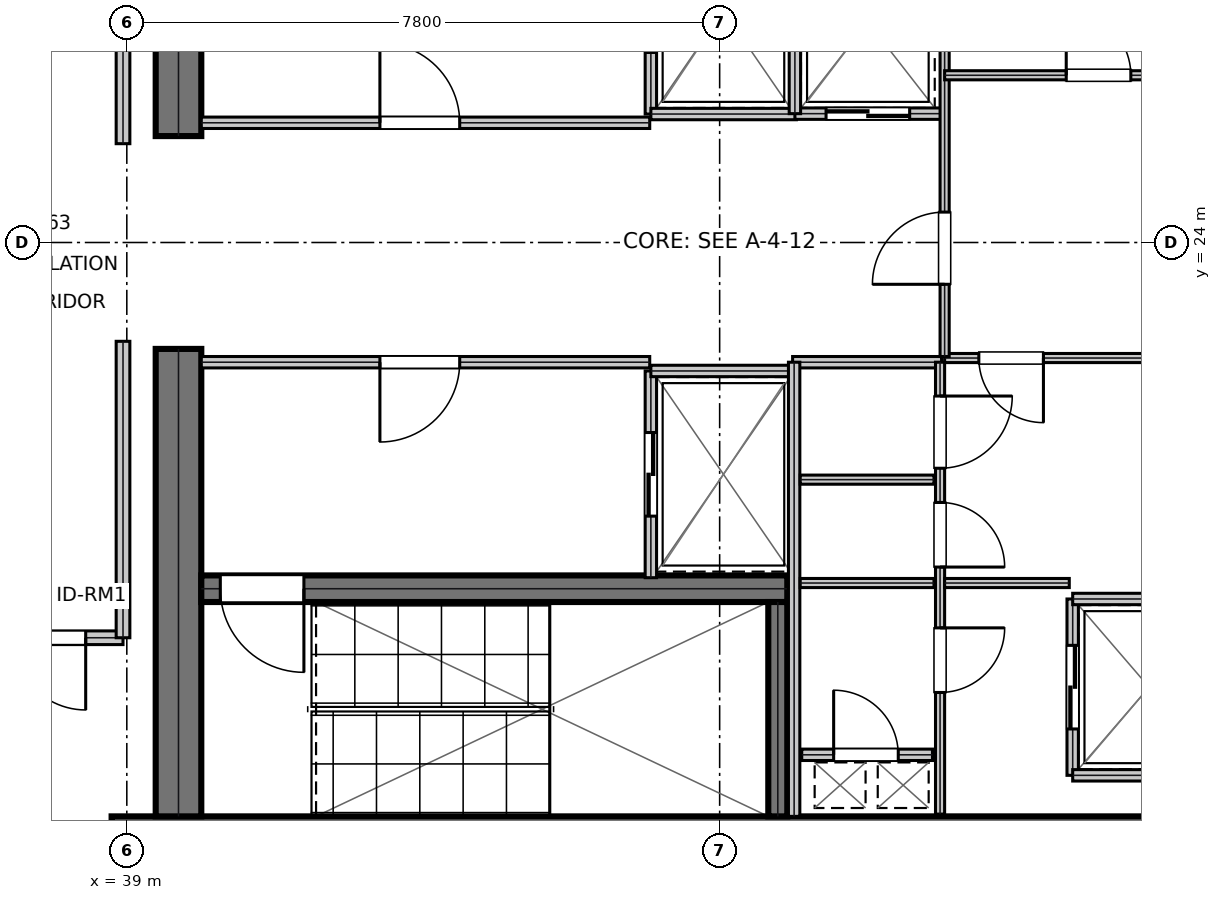
"""IFC4 building model, lengths in metres.
Left out: names, types, materials, properties, quantities, classifications, styles, units other than length and angle.
Written with IfcOpenShell. Run it as: python <this file> out.ifc"""

import sys

from ifc_helpers import new_model, si_unit, direction, frame, frame_2d, origin, place, context, subcontext, project, spatial, rectangle, extrude, element, fill, save


model = new_model("IFC4")
c1 = context("Model", 3, precision=1e-05, world=origin(), true_north=direction((0.0, 1.0)))
c2 = subcontext(c1, "Body", "Model", "MODEL_VIEW")
j1 = project(units=[si_unit("LENGTHUNIT", "METRE"), si_unit("PLANEANGLEUNIT", "RADIAN")], contexts=[c1])
p1 = place(None, origin())
s1 = spatial("IfcSite", under=j1, at=p1, CompositionType="ELEMENT")
p2 = place(p1, origin())
s2 = spatial("IfcBuilding", under=s1, at=p2, CompositionType="ELEMENT")
p3 = place(p2, frame((0.0, 0.0, 270.9)))
s3 = spatial("IfcBuildingStorey", under=s2, at=p3, CompositionType="ELEMENT", Elevation=270.9)
p4 = place(p3, frame((38.8, 16.15, 0.0), z_axis=(0.0, 0.0, 1.0), x_axis=(1.0, 0.0, 0.0)))
e1 = element("IfcWall", 1, at=p4, inside=s3, PredefinedType="SHEAR", context=c2, shape_type="SweptSolid", body=[
    extrude(rectangle(XDim=16.0, YDim=0.6, at=frame_2d((8.0, 0.0))), origin(), (0.0, 0.0, 1.0), 3.81),
])
for number, where, z_axis, x_axis in (
    (2, (39.68, 16.45, 0.0), (0.0, 0.0, 1.0), (0.0, 1.0, 0.0)),
    (3, (39.68, 25.4, 0.0), (0.0, 0.0, 1.0), (0.0, 1.0, 0.0)),
):
    element("IfcWall", number, at=place(p3, frame(where, z_axis=z_axis, x_axis=x_axis)), inside=s3, PredefinedType="SHEAR", context=c2, shape_type="SweptSolid", body=[
        extrude(rectangle(XDim=6.15, YDim=0.6, at=frame_2d((3.075, 0.0))), origin(), (0.0, 0.0, 1.0), 3.81),
    ])
p5 = place(p3, frame((39.98, 19.445, 0.0), z_axis=(0.0, 0.0, 1.0), x_axis=(1.0, 0.0, 0.0)))
e4 = element("IfcWall", 4, at=p5, inside=s3, PredefinedType="SHEAR", context=c2, shape_type="SweptSolid", body=[
    extrude(rectangle(XDim=7.71, YDim=0.35, at=frame_2d((3.855, 0.0))), origin(), (0.0, 0.0, 1.0), 3.81),
])
p6 = place(p5, frame((0.25, 0.0, 0.0)))
e5 = element("IfcOpeningElement", 5, at=p6, cuts=e4, PredefinedType="OPENING", context=c2, shape_type="SweptSolid", body=[
    extrude(rectangle(XDim=1.1, YDim=2.15, at=frame_2d((0.55, 1.075))), frame((0.0, 0.185, 0.0), z_axis=(0.0, -1.0, 0.0), x_axis=(1.0, 0.0, 0.0)), (0.0, 0.0, 1.0), 0.37),
])
p7 = place(p3, frame((47.565, 16.45, 0.0), z_axis=(0.0, 0.0, 1.0), x_axis=(0.0, 1.0, 0.0)))
e6 = element("IfcWall", 6, at=p7, inside=s3, PredefinedType="SHEAR", context=c2, shape_type="SweptSolid", body=[
    extrude(rectangle(XDim=2.82, YDim=0.25, at=frame_2d((1.41, 0.0))), origin(), (0.0, 0.0, 1.0), 3.81),
])
p8 = place(p3, frame((39.98, 25.575, 0.0), z_axis=(0.0, 0.0, 1.0), x_axis=(1.0, 0.0, 0.0)))
e7 = element("IfcWall", 7, at=p8, inside=s3, PredefinedType="PARTITIONING", context=c2, shape_type="SweptSolid", body=[
    extrude(rectangle(XDim=5.9, YDim=0.15, at=frame_2d((2.95, 0.0))), origin(), (0.0, 0.0, 1.0), 3.81),
])
p9 = place(p8, frame((2.35, 0.0, 0.0)))
e8 = element("IfcOpeningElement", 8, at=p9, cuts=e7, PredefinedType="OPENING", context=c2, shape_type="SweptSolid", body=[
    extrude(rectangle(XDim=1.05, YDim=2.15, at=frame_2d((0.525, 1.075))), frame((0.0, 0.085, 0.0), z_axis=(0.0, -1.0, 0.0), x_axis=(1.0, 0.0, 0.0)), (0.0, 0.0, 1.0), 0.17),
])
p10 = place(p3, frame((39.98, 22.425, 0.0), z_axis=(0.0, 0.0, 1.0), x_axis=(1.0, 0.0, 0.0)))
e9 = element("IfcWall", 9, at=p10, inside=s3, PredefinedType="PARTITIONING", context=c2, shape_type="SweptSolid", body=[
    extrude(rectangle(XDim=5.9, YDim=0.15, at=frame_2d((2.95, 0.0))), origin(), (0.0, 0.0, 1.0), 3.81),
])
p11 = place(p10, frame((2.35, 0.0, 0.0)))
e10 = element("IfcOpeningElement", 10, at=p11, cuts=e9, PredefinedType="OPENING", context=c2, shape_type="SweptSolid", body=[
    extrude(rectangle(XDim=1.05, YDim=2.15, at=frame_2d((0.525, 1.075))), frame((0.0, 0.085, 0.0), z_axis=(0.0, -1.0, 0.0), x_axis=(1.0, 0.0, 0.0)), (0.0, 0.0, 1.0), 0.17),
])
p12 = place(p3, frame((45.895, 25.69, 0.0), z_axis=(0.0, 0.0, 1.0), x_axis=(0.0, 1.0, 0.0)))
e11 = element("IfcWall", 11, at=p12, inside=s3, PredefinedType="PARTITIONING", context=c2, shape_type="SweptSolid", body=[
    extrude(rectangle(XDim=2.72, YDim=0.15, at=frame_2d((1.36, 0.0))), origin(), (0.0, 0.0, 1.0), 3.81),
])
p13 = place(p12, frame((0.81, 0.0, 0.0)))
e12 = element("IfcOpeningElement", 12, at=p13, cuts=e11, PredefinedType="OPENING", context=c2, shape_type="SweptSolid", body=[
    extrude(rectangle(XDim=1.1, YDim=2.15, at=frame_2d((0.55, 1.075))), frame((0.0, 0.085, 0.0), z_axis=(0.0, -1.0, 0.0), x_axis=(1.0, 0.0, 0.0)), (0.0, 0.0, 1.0), 0.17),
])
p14 = place(p3, frame((45.895, 25.69, 0.0), z_axis=(0.0, 0.0, 1.0), x_axis=(1.0, 0.0, 0.0)))
e13 = element("IfcWall", 13, at=p14, inside=s3, PredefinedType="PARTITIONING", context=c2, shape_type="SweptSolid", body=[
    extrude(rectangle(XDim=1.915, YDim=0.15, at=frame_2d((0.958, 0.0))), origin(), (0.0, 0.0, 1.0), 3.81),
])
p15 = place(p3, frame((45.895, 19.59, 0.0), z_axis=(0.0, 0.0, 1.0), x_axis=(0.0, 1.0, 0.0)))
e14 = element("IfcWall", 14, at=p15, inside=s3, PredefinedType="PARTITIONING", context=c2, shape_type="SweptSolid", body=[
    extrude(rectangle(XDim=2.72, YDim=0.15, at=frame_2d((1.36, 0.0))), origin(), (0.0, 0.0, 1.0), 3.81),
])
p16 = place(p15, frame((0.81, 0.0, 0.0)))
e15 = element("IfcOpeningElement", 15, at=p16, cuts=e14, PredefinedType="OPENING", context=c2, shape_type="SweptSolid", body=[
    extrude(rectangle(XDim=1.1, YDim=2.15, at=frame_2d((0.55, 1.075))), frame((0.0, 0.085, 0.0), z_axis=(0.0, -1.0, 0.0), x_axis=(1.0, 0.0, 0.0)), (0.0, 0.0, 1.0), 0.17),
])
p17 = place(p3, frame((45.895, 22.31, 0.0), z_axis=(0.0, 0.0, 1.0), x_axis=(1.0, 0.0, 0.0)))
e16 = element("IfcWall", 16, at=p17, inside=s3, PredefinedType="PARTITIONING", context=c2, shape_type="SweptSolid", body=[
    extrude(rectangle(XDim=1.915, YDim=0.15, at=frame_2d((0.958, 0.0))), origin(), (0.0, 0.0, 1.0), 3.81),
])
p18 = place(p3, frame((47.79, 25.695, 0.0), z_axis=(0.0, 0.0, 1.0), x_axis=(1.0, 0.0, 0.0)))
e17 = element("IfcWall", 17, at=p18, inside=s3, PredefinedType="PARTITIONING", context=c2, shape_type="SweptSolid", body=[
    extrude(rectangle(XDim=1.92, YDim=0.15, at=frame_2d((0.96, 0.0))), origin(), (0.0, 0.0, 1.0), 3.81),
])
p19 = place(p18, frame((0.41, 0.0, 0.0)))
e18 = element("IfcOpeningElement", 18, at=p19, cuts=e17, PredefinedType="OPENING", context=c2, shape_type="SweptSolid", body=[
    extrude(rectangle(XDim=1.1, YDim=2.15, at=frame_2d((0.55, 1.075))), frame((0.0, 0.085, 0.0), z_axis=(0.0, -1.0, 0.0), x_axis=(1.0, 0.0, 0.0)), (0.0, 0.0, 1.0), 0.17),
])
p20 = place(p3, frame((47.79, 25.695, 0.0), z_axis=(0.0, 0.0, 1.0), x_axis=(0.0, 1.0, 0.0)))
e19 = element("IfcWall", 19, at=p20, inside=s3, PredefinedType="PARTITIONING", context=c2, shape_type="SweptSolid", body=[
    extrude(rectangle(XDim=2.415, YDim=0.15, at=frame_2d((1.208, 0.0))), origin(), (0.0, 0.0, 1.0), 3.81),
])
p21 = place(p3, frame((51.445, 16.99, 0.0), z_axis=(0.0, 0.0, 1.0), x_axis=(0.0, 1.0, 0.0)))
e20 = element("IfcWall", 20, at=p21, inside=s3, PredefinedType="PARTITIONING", context=c2, shape_type="SweptSolid", body=[
    extrude(rectangle(XDim=2.32, YDim=0.15, at=frame_2d((1.16, 0.0))), origin(), (0.0, 0.0, 1.0), 3.81),
])
p22 = place(p21, frame((0.61, 0.0, 0.0)))
e21 = element("IfcOpeningElement", 21, at=p22, cuts=e20, PredefinedType="OPENING", context=c2, shape_type="SweptSolid", body=[
    extrude(rectangle(XDim=1.1, YDim=2.15, at=frame_2d((0.55, 1.075))), frame((0.0, 0.085, 0.0), z_axis=(0.0, -1.0, 0.0), x_axis=(1.0, 0.0, 0.0)), (0.0, 0.0, 1.0), 0.17),
])
for number, where, z_axis, x_axis in (
    (22, (51.445, 16.99, 0.0), (0.0, 0.0, 1.0), (1.0, 0.0, 0.0)),
    (23, (51.445, 19.31, 0.0), (0.0, 0.0, 1.0), (1.0, 0.0, 0.0)),
):
    element("IfcWall", number, at=place(p3, frame(where, z_axis=z_axis, x_axis=x_axis)), inside=s3, PredefinedType="PARTITIONING", context=c2, shape_type="SweptSolid", body=[
        extrude(rectangle(XDim=2.015, YDim=0.15, at=frame_2d((1.007, 0.0))), origin(), (0.0, 0.0, 1.0), 3.81),
    ])
p23 = place(p3, frame((47.88, 17.26, 0.0), z_axis=(0.0, 0.0, 1.0), x_axis=(1.0, 0.0, 0.0)))
e24 = element("IfcWall", 24, at=p23, inside=s3, PredefinedType="PARTITIONING", context=c2, shape_type="SweptSolid", body=[
    extrude(rectangle(XDim=1.72, YDim=0.15, at=frame_2d((0.86, 0.0))), origin(), (0.0, 0.0, 1.0), 3.81),
])
p24 = place(p23, frame((0.42, 0.0, 0.0)))
e25 = element("IfcOpeningElement", 25, at=p24, cuts=e24, PredefinedType="OPENING", context=c2, shape_type="SweptSolid", body=[
    extrude(rectangle(XDim=0.85, YDim=2.15, at=frame_2d((0.425, 1.075))), frame((0.0, 0.085, 0.0), z_axis=(0.0, -1.0, 0.0), x_axis=(1.0, 0.0, 0.0)), (0.0, 0.0, 1.0), 0.17),
])
p25 = place(p3, frame((47.76, 22.425, 0.0), z_axis=(0.0, 0.0, 1.0), x_axis=(1.0, 0.0, 0.0)))
e26 = element("IfcWall", 26, at=p25, inside=s3, PredefinedType="PARTITIONING", context=c2, shape_type="SweptSolid", body=[
    extrude(rectangle(XDim=1.96, YDim=0.15, at=frame_2d((0.98, 0.0))), origin(), (0.0, 0.0, 1.0), 3.81),
])
p26 = place(p3, frame((47.78, 16.45, 0.0), z_axis=(0.0, 0.0, 1.0), x_axis=(0.0, 1.0, 0.0)))
e27 = element("IfcWall", 27, at=p26, inside=s3, PredefinedType="PARTITIONING", context=c2, shape_type="SweptSolid", body=[
    extrude(rectangle(XDim=5.975, YDim=0.15, at=frame_2d((2.988, 0.0))), origin(), (0.0, 0.0, 1.0), 3.81),
])
for number, where, z_axis, x_axis in (
    (28, (47.86, 19.52, 0.0), (0.0, 0.0, 1.0), (1.0, 0.0, 0.0)),
    (29, (47.86, 20.88, 0.0), (0.0, 0.0, 1.0), (1.0, 0.0, 0.0)),
):
    element("IfcWall", number, at=place(p3, frame(where, z_axis=z_axis, x_axis=x_axis)), inside=s3, PredefinedType="PARTITIONING", context=c2, shape_type="SweptSolid", body=[
        extrude(rectangle(XDim=1.76, YDim=0.12, at=frame_2d((0.88, 0.0))), origin(), (0.0, 0.0, 1.0), 3.81),
    ])
p27 = place(p3, frame((49.7, 16.48, 0.0), z_axis=(0.0, 0.0, 1.0), x_axis=(0.0, 1.0, 0.0)))
e30 = element("IfcWall", 30, at=p27, inside=s3, PredefinedType="PARTITIONING", context=c2, shape_type="SweptSolid", body=[
    extrude(rectangle(XDim=5.945, YDim=0.12, at=frame_2d((2.973, 0.0))), origin(), (0.0, 0.0, 1.0), 3.81),
])
p28 = place(p27, frame((1.6, 0.0, 0.0)))
e31 = element("IfcOpeningElement", 31, at=p28, cuts=e30, PredefinedType="OPENING", context=c2, shape_type="SweptSolid", body=[
    extrude(rectangle(XDim=0.85, YDim=2.15, at=frame_2d((0.425, 1.075))), frame((0.0, 0.07, 0.0), z_axis=(0.0, -1.0, 0.0), x_axis=(1.0, 0.0, 0.0)), (0.0, 0.0, 1.0), 0.14),
])
p29 = place(p27, frame((3.25, 0.0, 0.0)))
e32 = element("IfcOpeningElement", 32, at=p29, cuts=e30, PredefinedType="OPENING", context=c2, shape_type="SweptSolid", body=[
    extrude(rectangle(XDim=0.85, YDim=2.15, at=frame_2d((0.425, 1.075))), frame((0.0, 0.07, 0.0), z_axis=(0.0, -1.0, 0.0), x_axis=(1.0, 0.0, 0.0)), (0.0, 0.0, 1.0), 0.14),
])
p30 = place(p27, frame((4.55, 0.0, 0.0)))
e33 = element("IfcOpeningElement", 33, at=p30, cuts=e30, PredefinedType="OPENING", context=c2, shape_type="SweptSolid", body=[
    extrude(rectangle(XDim=0.95, YDim=2.15, at=frame_2d((0.475, 1.075))), frame((0.0, 0.07, 0.0), z_axis=(0.0, -1.0, 0.0), x_axis=(1.0, 0.0, 0.0)), (0.0, 0.0, 1.0), 0.14),
])
p31 = place(p3, frame((49.76, 22.48, 0.0), z_axis=(0.0, 0.0, 1.0), x_axis=(1.0, 0.0, 0.0)))
e34 = element("IfcWall", 34, at=p31, inside=s3, PredefinedType="PARTITIONING", context=c2, shape_type="SweptSolid", body=[
    extrude(rectangle(XDim=3.9, YDim=0.12, at=frame_2d((1.95, 0.0))), origin(), (0.0, 0.0, 1.0), 3.81),
])
p32 = place(p31, frame((0.45, 0.0, 0.0)))
e35 = element("IfcOpeningElement", 35, at=p32, cuts=e34, PredefinedType="OPENING", context=c2, shape_type="SweptSolid", body=[
    extrude(rectangle(XDim=0.85, YDim=2.15, at=frame_2d((0.425, 1.075))), frame((0.0, 0.07, 0.0), z_axis=(0.0, -1.0, 0.0), x_axis=(1.0, 0.0, 0.0)), (0.0, 0.0, 1.0), 0.14),
])
p33 = place(p3, frame((49.76, 19.52, 0.0), z_axis=(0.0, 0.0, 1.0), x_axis=(1.0, 0.0, 0.0)))
e36 = element("IfcWall", 36, at=p33, inside=s3, PredefinedType="PARTITIONING", context=c2, shape_type="SweptSolid", body=[
    extrude(rectangle(XDim=1.64, YDim=0.12, at=frame_2d((0.82, 0.0))), origin(), (0.0, 0.0, 1.0), 3.81),
])
p34 = place(p3, frame((49.76, 22.5, 0.0), z_axis=(0.0, 0.0, 1.0), x_axis=(0.0, 1.0, 0.0)))
e37 = element("IfcWall", 37, at=p34, inside=s3, PredefinedType="PARTITIONING", context=c2, shape_type="SweptSolid", body=[
    extrude(rectangle(XDim=5.72, YDim=0.12, at=frame_2d((2.86, 0.0))), origin(), (0.0, 0.0, 1.0), 3.81),
])
p35 = place(p34, frame((0.95, 0.0, 0.0)))
e38 = element("IfcOpeningElement", 38, at=p35, cuts=e37, PredefinedType="OPENING", context=c2, shape_type="SweptSolid", body=[
    extrude(rectangle(XDim=0.95, YDim=2.15, at=frame_2d((0.475, 1.075))), frame((0.0, 0.07, 0.0), z_axis=(0.0, -1.0, 0.0), x_axis=(1.0, 0.0, 0.0)), (0.0, 0.0, 1.0), 0.14),
])
p36 = place(p3, frame((49.76, 26.2, 0.0), z_axis=(0.0, 0.0, 1.0), x_axis=(1.0, 0.0, 0.0)))
e39 = element("IfcWall", 39, at=p36, inside=s3, PredefinedType="PARTITIONING", context=c2, shape_type="SweptSolid", body=[
    extrude(rectangle(XDim=3.9, YDim=0.12, at=frame_2d((1.95, 0.0))), origin(), (0.0, 0.0, 1.0), 3.81),
])
p37 = place(p36, frame((1.6, 0.0, 0.0)))
e40 = element("IfcOpeningElement", 40, at=p37, cuts=e39, PredefinedType="OPENING", context=c2, shape_type="SweptSolid", body=[
    extrude(rectangle(XDim=0.85, YDim=2.15, at=frame_2d((0.425, 1.075))), frame((0.0, 0.07, 0.0), z_axis=(0.0, -1.0, 0.0), x_axis=(1.0, 0.0, 0.0)), (0.0, 0.0, 1.0), 0.14),
])
p38 = place(p3, frame((35.938, 18.8, 0.0), z_axis=(0.0, 0.0, 1.0), x_axis=(1.0, 0.0, 0.0)))
e41 = element("IfcWall", 41, at=p38, inside=s3, PredefinedType="SOLIDWALL", context=c2, shape_type="SweptSolid", body=[
    extrude(rectangle(XDim=3.012, YDim=0.18, at=frame_2d((1.506, 0.0))), origin(), (0.0, 0.0, 1.0), 3.81),
])
p39 = place(p38, frame((1.571, 0.0, 0.0)))
e42 = element("IfcOpeningElement", 42, at=p39, cuts=e41, PredefinedType="OPENING", context=c2, shape_type="SweptSolid", body=[
    extrude(rectangle(XDim=0.95, YDim=2.15, at=frame_2d((0.475, 1.075))), frame((0.0, 0.1, 0.0), z_axis=(0.0, -1.0, 0.0), x_axis=(1.0, 0.0, 0.0)), (0.0, 0.0, 1.0), 0.2),
])
p40 = place(p3, frame((38.95, 18.8, 0.0), z_axis=(0.0, 0.0, 1.0), x_axis=(0.0, 1.0, 0.0)))
e43 = element("IfcWall", 43, at=p40, inside=s3, PredefinedType="SOLIDWALL", context=c2, shape_type="SweptSolid", body=[
    extrude(rectangle(XDim=3.9, YDim=0.18, at=frame_2d((1.95, 0.0))), origin(), (0.0, 0.0, 1.0), 3.54),
])
p41 = place(p3, frame((38.95, 25.3, 0.0), z_axis=(0.0, 0.0, 1.0), x_axis=(0.0, 1.0, 0.0)))
e44 = element("IfcWall", 44, at=p41, inside=s3, PredefinedType="SOLIDWALL", context=c2, shape_type="SweptSolid", body=[
    extrude(rectangle(XDim=3.5, YDim=0.18, at=frame_2d((1.75, 0.0))), origin(), (0.0, 0.0, 1.0), 3.54),
])
p42 = place(p9, origin())
e45 = element("IfcDoor", 45, at=p42, inside=s3, OperationType="SINGLE_SWING_LEFT", PredefinedType="DOOR", context=c2, shape_type="SweptSolid", body=[
    extrude(rectangle(XDim=1.05, YDim=2.15, at=frame_2d((0.525, 1.075))), frame((0.0, 0.025, 0.0), z_axis=(0.0, -1.0, 0.0), x_axis=(1.0, 0.0, 0.0)), (0.0, 0.0, 1.0), 0.05),
])
fill(e8, e45)
p43 = place(p11, frame((1.05, 0.0, 0.0), z_axis=(0.0, 0.0, 1.0), x_axis=(-1.0, 0.0, 0.0)))
e46 = element("IfcDoor", 46, at=p43, inside=s3, OperationType="SINGLE_SWING_RIGHT", PredefinedType="DOOR", context=c2, shape_type="SweptSolid", body=[
    extrude(rectangle(XDim=1.05, YDim=2.15, at=frame_2d((0.525, 1.075))), frame((0.0, 0.025, 0.0), z_axis=(0.0, -1.0, 0.0), x_axis=(1.0, 0.0, 0.0)), (0.0, 0.0, 1.0), 0.05),
])
fill(e10, e46)
p44 = place(p16, frame((1.1, 0.0, 0.0), z_axis=(0.0, 0.0, 1.0), x_axis=(-1.0, 0.0, 0.0)))
e47 = element("IfcDoor", 47, at=p44, inside=s3, OperationType="DOUBLE_DOOR_SLIDING", PredefinedType="DOOR", context=c2, shape_type="SweptSolid", body=[
    extrude(rectangle(XDim=1.1, YDim=2.15, at=frame_2d((0.55, 1.075))), frame((0.0, 0.025, 0.0), z_axis=(0.0, -1.0, 0.0), x_axis=(1.0, 0.0, 0.0)), (0.0, 0.0, 1.0), 0.05),
])
fill(e15, e47)
p45 = place(p19, frame((1.1, 0.0, 0.0), z_axis=(0.0, 0.0, 1.0), x_axis=(-1.0, 0.0, 0.0)))
e48 = element("IfcDoor", 48, at=p45, inside=s3, OperationType="DOUBLE_DOOR_SLIDING", PredefinedType="DOOR", context=c2, shape_type="SweptSolid", body=[
    extrude(rectangle(XDim=1.1, YDim=2.15, at=frame_2d((0.55, 1.075))), frame((0.0, 0.025, 0.0), z_axis=(0.0, -1.0, 0.0), x_axis=(1.0, 0.0, 0.0)), (0.0, 0.0, 1.0), 0.05),
])
fill(e18, e48)
p46 = place(p22, frame((1.1, 0.0, 0.0), z_axis=(0.0, 0.0, 1.0), x_axis=(-1.0, 0.0, 0.0)))
e49 = element("IfcDoor", 49, at=p46, inside=s3, OperationType="DOUBLE_DOOR_SLIDING", PredefinedType="DOOR", context=c2, shape_type="SweptSolid", body=[
    extrude(rectangle(XDim=1.1, YDim=2.15, at=frame_2d((0.55, 1.075))), frame((0.0, 0.025, 0.0), z_axis=(0.0, -1.0, 0.0), x_axis=(1.0, 0.0, 0.0)), (0.0, 0.0, 1.0), 0.05),
])
fill(e21, e49)
p47 = place(p24, origin())
e50 = element("IfcDoor", 50, at=p47, inside=s3, OperationType="SINGLE_SWING_LEFT", PredefinedType="TRAPDOOR", context=c2, shape_type="SweptSolid", body=[
    extrude(rectangle(XDim=0.85, YDim=2.15, at=frame_2d((0.425, 1.075))), frame((0.0, 0.025, 0.0), z_axis=(0.0, -1.0, 0.0), x_axis=(1.0, 0.0, 0.0)), (0.0, 0.0, 1.0), 0.05),
])
fill(e25, e50)
p48 = place(p28, frame((0.85, 0.0, 0.0), z_axis=(0.0, 0.0, 1.0), x_axis=(-1.0, 0.0, 0.0)))
e51 = element("IfcDoor", 51, at=p48, inside=s3, OperationType="SINGLE_SWING_LEFT", PredefinedType="DOOR", context=c2, shape_type="SweptSolid", body=[
    extrude(rectangle(XDim=0.85, YDim=2.15, at=frame_2d((0.425, 1.075))), frame((0.0, 0.025, 0.0), z_axis=(0.0, -1.0, 0.0), x_axis=(1.0, 0.0, 0.0)), (0.0, 0.0, 1.0), 0.05),
])
fill(e31, e51)
p49 = place(p29, frame((0.85, 0.0, 0.0), z_axis=(0.0, 0.0, 1.0), x_axis=(-1.0, 0.0, 0.0)))
e52 = element("IfcDoor", 52, at=p49, inside=s3, OperationType="SINGLE_SWING_RIGHT", PredefinedType="DOOR", context=c2, shape_type="SweptSolid", body=[
    extrude(rectangle(XDim=0.85, YDim=2.15, at=frame_2d((0.425, 1.075))), frame((0.0, 0.025, 0.0), z_axis=(0.0, -1.0, 0.0), x_axis=(1.0, 0.0, 0.0)), (0.0, 0.0, 1.0), 0.05),
])
fill(e32, e52)
p50 = place(p30, frame((0.95, 0.0, 0.0), z_axis=(0.0, 0.0, 1.0), x_axis=(-1.0, 0.0, 0.0)))
e53 = element("IfcDoor", 53, at=p50, inside=s3, OperationType="SINGLE_SWING_LEFT", PredefinedType="DOOR", context=c2, shape_type="SweptSolid", body=[
    extrude(rectangle(XDim=0.95, YDim=2.15, at=frame_2d((0.475, 1.075))), frame((0.0, 0.025, 0.0), z_axis=(0.0, -1.0, 0.0), x_axis=(1.0, 0.0, 0.0)), (0.0, 0.0, 1.0), 0.05),
])
fill(e33, e53)
p51 = place(p32, frame((0.85, 0.0, 0.0), z_axis=(0.0, 0.0, 1.0), x_axis=(-1.0, 0.0, 0.0)))
e54 = element("IfcDoor", 54, at=p51, inside=s3, OperationType="SINGLE_SWING_LEFT", PredefinedType="DOOR", context=c2, shape_type="SweptSolid", body=[
    extrude(rectangle(XDim=0.85, YDim=2.15, at=frame_2d((0.425, 1.075))), frame((0.0, 0.025, 0.0), z_axis=(0.0, -1.0, 0.0), x_axis=(1.0, 0.0, 0.0)), (0.0, 0.0, 1.0), 0.05),
])
fill(e35, e54)
p52 = place(p35, origin())
e55 = element("IfcDoor", 55, at=p52, inside=s3, OperationType="SINGLE_SWING_LEFT", PredefinedType="DOOR", context=c2, shape_type="SweptSolid", body=[
    extrude(rectangle(XDim=0.95, YDim=2.15, at=frame_2d((0.475, 1.075))), frame((0.0, 0.025, 0.0), z_axis=(0.0, -1.0, 0.0), x_axis=(1.0, 0.0, 0.0)), (0.0, 0.0, 1.0), 0.05),
])
fill(e38, e55)
p53 = place(p37, origin())
e56 = element("IfcDoor", 56, at=p53, inside=s3, OperationType="SINGLE_SWING_LEFT", PredefinedType="DOOR", context=c2, shape_type="SweptSolid", body=[
    extrude(rectangle(XDim=0.85, YDim=2.15, at=frame_2d((0.425, 1.075))), frame((0.0, 0.025, 0.0), z_axis=(0.0, -1.0, 0.0), x_axis=(1.0, 0.0, 0.0)), (0.0, 0.0, 1.0), 0.05),
])
fill(e40, e56)
p54 = place(p39, frame((0.95, 0.0, 0.0), z_axis=(0.0, 0.0, 1.0), x_axis=(-1.0, 0.0, 0.0)))
e57 = element("IfcDoor", 57, at=p54, inside=s3, OperationType="SINGLE_SWING_LEFT", PredefinedType="DOOR", context=c2, shape_type="SweptSolid", body=[
    extrude(rectangle(XDim=0.95, YDim=2.15, at=frame_2d((0.475, 1.075))), frame((0.0, 0.025, 0.0), z_axis=(0.0, -1.0, 0.0), x_axis=(1.0, 0.0, 0.0)), (0.0, 0.0, 1.0), 0.05),
])
fill(e42, e57)
p55 = place(p6, frame((1.1, 0.0, 0.0), z_axis=(0.0, 0.0, 1.0), x_axis=(-1.0, 0.0, 0.0)))
e58 = element("IfcDoor", 58, at=p55, inside=s3, OperationType="SINGLE_SWING_LEFT", PredefinedType="DOOR", context=c2, shape_type="SweptSolid", body=[
    extrude(rectangle(XDim=1.1, YDim=2.15, at=frame_2d((0.55, 1.075))), frame((0.0, 0.025, 0.0), z_axis=(0.0, -1.0, 0.0), x_axis=(1.0, 0.0, 0.0)), (0.0, 0.0, 1.0), 0.05),
])
fill(e5, e58)
save(model, sys.argv[1])
